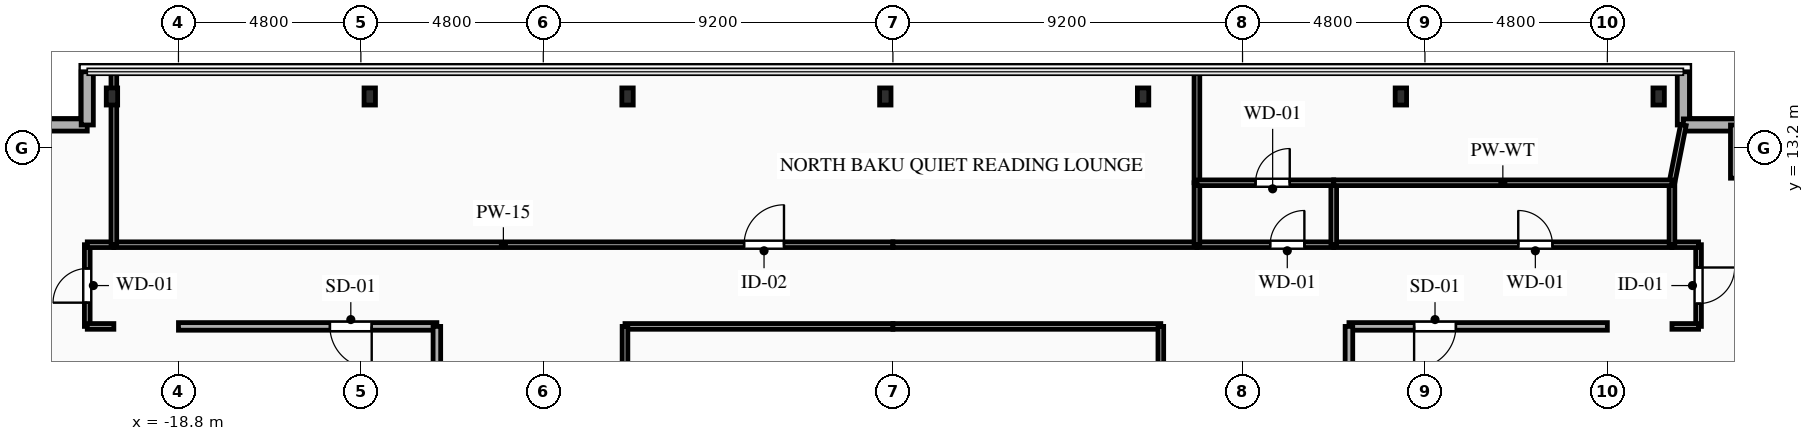
"""IFC4 building model, lengths in metres.
Left out: names, types, materials, properties, quantities, classifications, styles, units other than length and angle.
Written with IfcOpenShell. Run it as: python <this file> out.ifc"""

import sys

from ifc_helpers import new_model, si_unit, direction, frame, frame_2d, origin, origin_2d, place, context, subcontext, project, spatial, rectangle, i_section, extrude, element, fill, save


model = new_model("IFC4")
c1 = context("Model", 3, precision=1e-05, world=origin(), true_north=direction((0.0, 1.0)))
c2 = subcontext(c1, "Body", "Model", "MODEL_VIEW")
j1 = project(units=[si_unit("LENGTHUNIT", "METRE"), si_unit("PLANEANGLEUNIT", "RADIAN")], contexts=[c1])
p1 = place(None, origin())
s1 = spatial("IfcSite", under=j1, at=p1, CompositionType="ELEMENT")
p2 = place(p1, origin())
s2 = spatial("IfcBuilding", under=s1, at=p2, CompositionType="ELEMENT")
p3 = place(p2, frame((0.0, 0.0, 261.8)))
s3 = spatial("IfcBuildingStorey", under=s2, at=p3, CompositionType="ELEMENT", Elevation=261.8)
for number, where, z_axis, x_axis in (
    (1, (20.15, 14.55, 0.0), (0.0, 0.0, 1.0), (1.0, 0.0, 0.0)),
    (2, (13.367, 14.55, 0.0), (0.0, 0.0, 1.0), (1.0, 0.0, 0.0)),
    (3, (6.583, 14.55, 0.0), (0.0, 0.0, 1.0), (1.0, 0.0, 0.0)),
    (4, (-0.2, 14.55, 0.0), (0.0, 0.0, 1.0), (1.0, 0.0, 0.0)),
    (5, (-6.983, 14.55, 0.0), (0.0, 0.0, 1.0), (1.0, 0.0, 0.0)),
    (6, (-13.767, 14.55, 0.0), (0.0, 0.0, 1.0), (1.0, 0.0, 0.0)),
    (7, (-20.55, 14.55, 0.0), (0.0, 0.0, 1.0), (1.0, 0.0, 0.0)),
):
    element("IfcColumn", number, at=place(p3, frame(where, z_axis=z_axis, x_axis=x_axis)), inside=s3, PredefinedType="COLUMN", context=c2, shape_type="SweptSolid", body=[
        extrude(i_section(OverallWidth=0.3, OverallDepth=0.45, WebThickness=0.014, FlangeThickness=0.026, FilletRadius=0.027, at=origin_2d()), origin(), (0.0, 0.0, 1.0), 4.2),
    ])
p4 = place(p3, frame((-22.6, 13.8, 0.0), z_axis=(0.0, 0.0, 1.0), x_axis=(1.0, 0.0, 0.0)))
e8 = element("IfcWall", 8, at=p4, inside=s3, PredefinedType="SOLIDWALL", context=c2, shape_type="SweptSolid", body=[
    extrude(rectangle(XDim=1.4, YDim=0.32, at=frame_2d((0.7, 0.0))), origin(), (0.0, 0.0, 1.0), 3.78),
])
for number, where, z_axis, x_axis in (
    (9, (-21.2, 13.8, 0.0), (0.0, 0.0, 1.0), (0.0, 1.0, 0.0)),
    (10, (20.8, 15.2, 0.0), (0.0, 0.0, 1.0), (0.0, -1.0, 0.0)),
    (11, (20.8, 13.8, 0.0), (0.0, 0.0, 1.0), (1.0, 0.0, 0.0)),
):
    element("IfcWall", number, at=place(p3, frame(where, z_axis=z_axis, x_axis=x_axis)), inside=s3, PredefinedType="SOLIDWALL", context=c2, shape_type="SweptSolid", body=[
        extrude(rectangle(XDim=1.4, YDim=0.32, at=frame_2d((0.7, 0.0))), origin(), (0.0, 0.0, 1.0), 3.78),
    ])
p5 = place(p3, frame((22.2, 13.8, 0.0), z_axis=(0.0, 0.0, 1.0), x_axis=(0.0, -1.0, 0.0)))
e12 = element("IfcWall", 12, at=p5, inside=s3, PredefinedType="SOLIDWALL", context=c2, shape_type="SweptSolid", body=[
    extrude(rectangle(XDim=1.4, YDim=0.32, at=frame_2d((0.7, 0.0))), origin(), (0.0, 0.0, 1.0), 3.78),
])
p6 = place(p3, frame((-12.0, 8.5, 0.0), z_axis=(0.0, 0.0, 1.0), x_axis=(-1.0, 0.0, 0.0)))
e13 = element("IfcWall", 13, at=p6, inside=s3, PredefinedType="PARTITIONING", context=c2, shape_type="SweptSolid", body=[
    extrude(rectangle(XDim=6.8, YDim=0.2, at=frame_2d((3.4, 0.0))), origin(), (0.0, 0.0, 1.0), 3.78),
])
p7 = place(p6, frame((1.715, 0.0, 0.0)))
e14 = element("IfcOpeningElement", 14, at=p7, cuts=e13, PredefinedType="OPENING", context=c2, shape_type="SweptSolid", body=[
    extrude(rectangle(XDim=1.1, YDim=2.15, at=frame_2d((0.55, 1.075))), frame((0.0, 0.11, 0.0), z_axis=(0.0, -1.0, 0.0), x_axis=(1.0, 0.0, 0.0)), (0.0, 0.0, 1.0), 0.22),
])
p8 = place(p3, frame((-12.0, 5.6, 0.0), z_axis=(0.0, 0.0, 1.0), x_axis=(0.0, 1.0, 0.0)))
e15 = element("IfcWall", 15, at=p8, inside=s3, PredefinedType="PARTITIONING", context=c2, shape_type="SweptSolid", body=[
    extrude(rectangle(XDim=2.9, YDim=0.2, at=frame_2d((1.45, 0.0))), origin(), (0.0, 0.0, 1.0), 3.78),
])
p9 = place(p3, frame((18.8, 8.5, 0.0), z_axis=(0.0, 0.0, 1.0), x_axis=(-1.0, 0.0, 0.0)))
e16 = element("IfcWall", 16, at=p9, inside=s3, PredefinedType="PARTITIONING", context=c2, shape_type="SweptSolid", body=[
    extrude(rectangle(XDim=6.8, YDim=0.2, at=frame_2d((3.4, 0.0))), origin(), (0.0, 0.0, 1.0), 3.78),
])
p10 = place(p9, frame((3.985, 0.0, 0.0)))
e17 = element("IfcOpeningElement", 17, at=p10, cuts=e16, PredefinedType="OPENING", context=c2, shape_type="SweptSolid", body=[
    extrude(rectangle(XDim=1.1, YDim=2.15, at=frame_2d((0.55, 1.075))), frame((0.0, 0.11, 0.0), z_axis=(0.0, -1.0, 0.0), x_axis=(1.0, 0.0, 0.0)), (0.0, 0.0, 1.0), 0.22),
])
p11 = place(p3, frame((12.0, 8.5, 0.0), z_axis=(0.0, 0.0, 1.0), x_axis=(0.0, -1.0, 0.0)))
e18 = element("IfcWall", 18, at=p11, inside=s3, PredefinedType="PARTITIONING", context=c2, shape_type="SweptSolid", body=[
    extrude(rectangle(XDim=2.9, YDim=0.2, at=frame_2d((1.45, 0.0))), origin(), (0.0, 0.0, 1.0), 3.78),
])
p12 = place(p3, frame((-21.2, 8.5, 0.0), z_axis=(0.0, 0.0, 1.0), x_axis=(0.0, 1.0, 0.0)))
e19 = element("IfcWall", 19, at=p12, inside=s3, PredefinedType="PARTITIONING", context=c2, shape_type="SweptSolid", body=[
    extrude(rectangle(XDim=2.15, YDim=0.15, at=frame_2d((1.075, 0.0))), origin(), (0.0, 0.0, 1.0), 3.435),
])
p13 = place(p12, frame((0.625, 0.0, 0.0)))
e20 = element("IfcOpeningElement", 20, at=p13, cuts=e19, PredefinedType="OPENING", context=c2, shape_type="SweptSolid", body=[
    extrude(rectangle(XDim=0.9, YDim=2.1, at=frame_2d((0.45, 1.05))), frame((0.0, 0.085, 0.0), z_axis=(0.0, -1.0, 0.0), x_axis=(1.0, 0.0, 0.0)), (0.0, 0.0, 1.0), 0.17),
])
for number, where, z_axis, x_axis in (
    (21, (-20.5, 8.5, 0.0), (0.0, 0.0, 1.0), (-1.0, 0.0, 0.0)),
    (22, (-21.2, 10.65, 0.0), (0.0, 0.0, 1.0), (1.0, 0.0, 0.0)),
):
    element("IfcWall", number, at=place(p3, frame(where, z_axis=z_axis, x_axis=x_axis)), inside=s3, PredefinedType="PARTITIONING", context=c2, shape_type="SweptSolid", body=[
        extrude(rectangle(XDim=0.7, YDim=0.15, at=frame_2d((0.35, 0.0))), origin(), (0.0, 0.0, 1.0), 3.78),
    ])
p14 = place(p3, frame((-20.5, 10.65, 0.0), z_axis=(0.0, 0.0, 1.0), x_axis=(1.0, 0.0, 0.0)))
e23 = element("IfcWall", 23, at=p14, inside=s3, PredefinedType="PARTITIONING", context=c2, shape_type="SweptSolid", body=[
    extrude(rectangle(XDim=20.5, YDim=0.15, at=frame_2d((10.25, 0.0))), origin(), (0.0, 0.0, 1.0), 3.78),
])
p15 = place(p14, frame((16.584, 0.0, 0.0)))
e24 = element("IfcOpeningElement", 24, at=p15, cuts=e23, PredefinedType="OPENING", context=c2, shape_type="SweptSolid", body=[
    extrude(rectangle(XDim=1.05, YDim=2.15, at=frame_2d((0.525, 1.075))), frame((0.0, 0.085, 0.0), z_axis=(0.0, -1.0, 0.0), x_axis=(1.0, 0.0, 0.0)), (0.0, 0.0, 1.0), 0.17),
])
p16 = place(p3, frame((0.0, 8.5, 0.0), z_axis=(0.0, 0.0, 1.0), x_axis=(-1.0, 0.0, 0.0)))
e25 = element("IfcWall", 25, at=p16, inside=s3, PredefinedType="PARTITIONING", context=c2, shape_type="SweptSolid", body=[
    extrude(rectangle(XDim=7.05, YDim=0.15, at=frame_2d((3.525, 0.0))), origin(), (0.0, 0.0, 1.0), 3.78),
])
p17 = place(p3, frame((21.2, 10.65, 0.0), z_axis=(0.0, 0.0, 1.0), x_axis=(0.0, -1.0, 0.0)))
e26 = element("IfcWall", 26, at=p17, inside=s3, PredefinedType="PARTITIONING", context=c2, shape_type="SweptSolid", body=[
    extrude(rectangle(XDim=2.15, YDim=0.15, at=frame_2d((1.075, 0.0))), origin(), (0.0, 0.0, 1.0), 3.78),
])
p18 = place(p17, frame((0.6, 0.0, 0.0)))
e27 = element("IfcOpeningElement", 27, at=p18, cuts=e26, PredefinedType="OPENING", context=c2, shape_type="SweptSolid", body=[
    extrude(rectangle(XDim=0.95, YDim=2.1, at=frame_2d((0.475, 1.05))), frame((0.0, 0.085, 0.0), z_axis=(0.0, -1.0, 0.0), x_axis=(1.0, 0.0, 0.0)), (0.0, 0.0, 1.0), 0.17),
])
for number, where, z_axis, x_axis in (
    (28, (20.5, 10.65, 0.0), (0.0, 0.0, 1.0), (1.0, 0.0, 0.0)),
    (29, (21.2, 8.5, 0.0), (0.0, 0.0, 1.0), (-1.0, 0.0, 0.0)),
):
    element("IfcWall", number, at=place(p3, frame(where, z_axis=z_axis, x_axis=x_axis)), inside=s3, PredefinedType="PARTITIONING", context=c2, shape_type="SweptSolid", body=[
        extrude(rectangle(XDim=0.7, YDim=0.15, at=frame_2d((0.35, 0.0))), origin(), (0.0, 0.0, 1.0), 3.78),
    ])
p19 = place(p3, frame((0.0, 10.65, 0.0), z_axis=(0.0, 0.0, 1.0), x_axis=(1.0, 0.0, 0.0)))
e30 = element("IfcWall", 30, at=p19, inside=s3, PredefinedType="PARTITIONING", context=c2, shape_type="SweptSolid", body=[
    extrude(rectangle(XDim=8.0, YDim=0.15, at=frame_2d((4.0, 0.0))), origin(), (0.0, 0.0, 1.0), 3.78),
])
p20 = place(p3, frame((8.0, 10.65, 0.0), z_axis=(0.0, 0.0, 1.0), x_axis=(1.0, 0.0, 0.0)))
e31 = element("IfcWall", 31, at=p20, inside=s3, PredefinedType="PLUMBINGWALL", context=c2, shape_type="SweptSolid", body=[
    extrude(rectangle(XDim=3.6, YDim=0.15, at=frame_2d((1.8, 0.0))), origin(), (0.0, 0.0, 1.0), 3.78),
])
p21 = place(p20, frame((1.927, 0.0, 0.0)))
e32 = element("IfcOpeningElement", 32, at=p21, cuts=e31, PredefinedType="OPENING", context=c2, shape_type="SweptSolid", body=[
    extrude(rectangle(XDim=0.9, YDim=2.1, at=frame_2d((0.45, 1.05))), frame((0.0, 0.085, 0.0), z_axis=(0.0, -1.0, 0.0), x_axis=(1.0, 0.0, 0.0)), (0.0, 0.0, 1.0), 0.17),
])
p22 = place(p3, frame((11.6, 10.65, 0.0), z_axis=(0.0, 0.0, 1.0), x_axis=(1.0, 0.0, 0.0)))
e33 = element("IfcWall", 33, at=p22, inside=s3, PredefinedType="PLUMBINGWALL", context=c2, shape_type="SweptSolid", body=[
    extrude(rectangle(XDim=8.9, YDim=0.15, at=frame_2d((4.45, 0.0))), origin(), (0.0, 0.0, 1.0), 3.78),
])
p23 = place(p22, frame((4.855, 0.0, 0.0)))
e34 = element("IfcOpeningElement", 34, at=p23, cuts=e33, PredefinedType="OPENING", context=c2, shape_type="SweptSolid", body=[
    extrude(rectangle(XDim=0.9, YDim=2.1, at=frame_2d((0.45, 1.05))), frame((0.0, 0.085, 0.0), z_axis=(0.0, -1.0, 0.0), x_axis=(1.0, 0.0, 0.0)), (0.0, 0.0, 1.0), 0.17),
])
p24 = place(p3, frame((7.05, 8.5, 0.0), z_axis=(0.0, 0.0, 1.0), x_axis=(-1.0, 0.0, 0.0)))
e35 = element("IfcWall", 35, at=p24, inside=s3, PredefinedType="PARTITIONING", context=c2, shape_type="SweptSolid", body=[
    extrude(rectangle(XDim=7.05, YDim=0.15, at=frame_2d((3.525, 0.0))), origin(), (0.0, 0.0, 1.0), 3.78),
])
p25 = place(p3, frame((-7.05, 8.5, 0.0), z_axis=(0.0, 0.0, 1.0), x_axis=(0.0, -1.0, 0.0)))
e36 = element("IfcWall", 36, at=p25, inside=s3, PredefinedType="PARTITIONING", context=c2, shape_type="SweptSolid", body=[
    extrude(rectangle(XDim=14.1, YDim=0.15, at=frame_2d((7.05, 0.0))), origin(), (0.0, 0.0, 1.0), 3.78),
])
p26 = place(p25, frame((8.074, 0.0, 0.0)))
e37 = element("IfcOpeningElement", 37, at=p26, cuts=e36, PredefinedType="OPENING", context=c2, shape_type="SweptSolid", body=[
    extrude(rectangle(XDim=0.95, YDim=2.1, at=frame_2d((0.475, 1.05))), frame((0.0, 0.085, 0.0), z_axis=(0.0, -1.0, 0.0), x_axis=(1.0, 0.0, 0.0)), (0.0, 0.0, 1.0), 0.17),
])
p27 = place(p3, frame((7.05, -5.6, 0.0), z_axis=(0.0, 0.0, 1.0), x_axis=(0.0, 1.0, 0.0)))
e38 = element("IfcWall", 38, at=p27, inside=s3, PredefinedType="PARTITIONING", context=c2, shape_type="SweptSolid", body=[
    extrude(rectangle(XDim=14.1, YDim=0.15, at=frame_2d((7.05, 0.0))), origin(), (0.0, 0.0, 1.0), 3.78),
])
p28 = place(p3, frame((-20.5, 15.2, 0.0), z_axis=(0.0, 0.0, 1.0), x_axis=(0.0, -1.0, 0.0)))
e39 = element("IfcWall", 39, at=p28, inside=s3, PredefinedType="PARTITIONING", context=c2, shape_type="SweptSolid", body=[
    extrude(rectangle(XDim=4.55, YDim=0.15, at=frame_2d((2.275, 0.0))), origin(), (0.0, 0.0, 1.0), 3.405),
])
p29 = place(p3, frame((20.5, 10.65, 0.0), z_axis=(0.0, 0.0, 1.0), x_axis=(0.0, 1.0, 0.0)))
e40 = element("IfcWall", 40, at=p29, inside=s3, PredefinedType="PLUMBINGWALL", context=c2, shape_type="SweptSolid", body=[
    extrude(rectangle(XDim=1.63, YDim=0.15, at=frame_2d((0.815, 0.0))), origin(), (0.0, 0.0, 1.0), 3.78),
])
p30 = place(p3, frame((20.5, 12.28, 0.0), z_axis=(0.0, 0.0, 1.0), x_axis=(0.193660970649, 0.981068513636, 0.0)))
e41 = element("IfcWall", 41, at=p30, inside=s3, PredefinedType="PARTITIONING", context=c2, shape_type="SweptSolid", body=[
    extrude(rectangle(XDim=1.549, YDim=0.15, at=frame_2d((0.775, 0.0))), origin(), (0.0, 0.0, 1.0), 3.78),
])
p31 = place(p3, frame((8.0, 12.28, 0.0), z_axis=(0.0, 0.0, 1.0), x_axis=(0.0, -1.0, 0.0)))
e42 = element("IfcWall", 42, at=p31, inside=s3, PredefinedType="PLUMBINGWALL", context=c2, shape_type="SweptSolid", body=[
    extrude(rectangle(XDim=1.63, YDim=0.15, at=frame_2d((0.815, 0.0))), origin(), (0.0, 0.0, 1.0), 3.78),
])
p32 = place(p3, frame((8.0, 15.2, 0.0), z_axis=(0.0, 0.0, 1.0), x_axis=(0.0, -1.0, 0.0)))
e43 = element("IfcWall", 43, at=p32, inside=s3, PredefinedType="PARTITIONING", context=c2, shape_type="SweptSolid", body=[
    extrude(rectangle(XDim=2.92, YDim=0.15, at=frame_2d((1.46, 0.0))), origin(), (0.0, 0.0, 1.0), 3.78),
])
p33 = place(p3, frame((11.6, 12.28, 0.0), z_axis=(0.0, 0.0, 1.0), x_axis=(0.0, -1.0, 0.0)))
e44 = element("IfcWall", 44, at=p33, inside=s3, PredefinedType="PLUMBINGWALL", context=c2, shape_type="SweptSolid", body=[
    extrude(rectangle(XDim=1.63, YDim=0.15, at=frame_2d((0.815, 0.0))), origin(), (0.0, 0.0, 1.0), 3.78),
])
p34 = place(p3, frame((8.0, 12.28, 0.0), z_axis=(0.0, 0.0, 1.0), x_axis=(1.0, 0.0, 0.0)))
e45 = element("IfcWall", 45, at=p34, inside=s3, PredefinedType="PLUMBINGWALL", context=c2, shape_type="SweptSolid", body=[
    extrude(rectangle(XDim=3.6, YDim=0.15, at=frame_2d((1.8, 0.0))), origin(), (0.0, 0.0, 1.0), 3.78),
])
p35 = place(p34, frame((1.542, 0.0, 0.0)))
e46 = element("IfcOpeningElement", 46, at=p35, cuts=e45, PredefinedType="OPENING", context=c2, shape_type="SweptSolid", body=[
    extrude(rectangle(XDim=0.9, YDim=2.1, at=frame_2d((0.45, 1.05))), frame((0.0, 0.085, 0.0), z_axis=(0.0, -1.0, 0.0), x_axis=(1.0, 0.0, 0.0)), (0.0, 0.0, 1.0), 0.17),
])
p36 = place(p3, frame((11.6, 12.28, 0.0), z_axis=(0.0, 0.0, 1.0), x_axis=(1.0, 0.0, 0.0)))
e47 = element("IfcWall", 47, at=p36, inside=s3, PredefinedType="PLUMBINGWALL", context=c2, shape_type="SweptSolid", body=[
    extrude(rectangle(XDim=8.9, YDim=0.15, at=frame_2d((4.45, 0.0))), origin(), (0.0, 0.0, 1.0), 3.78),
])
p37 = place(p7, origin())
e48 = element("IfcDoor", 48, at=p37, inside=s3, OperationType="SINGLE_SWING_LEFT", PredefinedType="DOOR", context=c2, shape_type="SweptSolid", body=[
    extrude(rectangle(XDim=1.1, YDim=2.15, at=frame_2d((0.55, 1.075))), frame((0.0, 0.025, 0.0), z_axis=(0.0, -1.0, 0.0), x_axis=(1.0, 0.0, 0.0)), (0.0, 0.0, 1.0), 0.05),
])
fill(e14, e48)
p38 = place(p10, origin())
e49 = element("IfcDoor", 49, at=p38, inside=s3, OperationType="SINGLE_SWING_RIGHT", PredefinedType="DOOR", context=c2, shape_type="SweptSolid", body=[
    extrude(rectangle(XDim=1.1, YDim=2.15, at=frame_2d((0.55, 1.075))), frame((0.0, 0.025, 0.0), z_axis=(0.0, -1.0, 0.0), x_axis=(1.0, 0.0, 0.0)), (0.0, 0.0, 1.0), 0.05),
])
fill(e17, e49)
p39 = place(p13, origin())
e50 = element("IfcDoor", 50, at=p39, inside=s3, OperationType="SINGLE_SWING_LEFT", PredefinedType="DOOR", context=c2, shape_type="SweptSolid", body=[
    extrude(rectangle(XDim=0.9, YDim=2.1, at=frame_2d((0.45, 1.05))), frame((0.0, 0.025, 0.0), z_axis=(0.0, -1.0, 0.0), x_axis=(1.0, 0.0, 0.0)), (0.0, 0.0, 1.0), 0.05),
])
fill(e20, e50)
p40 = place(p15, origin())
e51 = element("IfcDoor", 51, at=p40, inside=s3, OperationType="SINGLE_SWING_RIGHT", PredefinedType="DOOR", context=c2, shape_type="SweptSolid", body=[
    extrude(rectangle(XDim=1.05, YDim=2.15, at=frame_2d((0.525, 1.075))), frame((0.0, 0.025, 0.0), z_axis=(0.0, -1.0, 0.0), x_axis=(1.0, 0.0, 0.0)), (0.0, 0.0, 1.0), 0.05),
])
fill(e24, e51)
p41 = place(p18, origin())
e52 = element("IfcDoor", 52, at=p41, inside=s3, OperationType="SINGLE_SWING_LEFT", PredefinedType="DOOR", context=c2, shape_type="SweptSolid", body=[
    extrude(rectangle(XDim=0.95, YDim=2.1, at=frame_2d((0.475, 1.05))), frame((0.0, 0.025, 0.0), z_axis=(0.0, -1.0, 0.0), x_axis=(1.0, 0.0, 0.0)), (0.0, 0.0, 1.0), 0.05),
])
fill(e27, e52)
p42 = place(p21, origin())
e53 = element("IfcDoor", 53, at=p42, inside=s3, OperationType="SINGLE_SWING_RIGHT", PredefinedType="DOOR", context=c2, shape_type="SweptSolid", body=[
    extrude(rectangle(XDim=0.9, YDim=2.1, at=frame_2d((0.45, 1.05))), frame((0.0, 0.025, 0.0), z_axis=(0.0, -1.0, 0.0), x_axis=(1.0, 0.0, 0.0)), (0.0, 0.0, 1.0), 0.05),
])
fill(e32, e53)
p43 = place(p23, origin())
e54 = element("IfcDoor", 54, at=p43, inside=s3, OperationType="SINGLE_SWING_LEFT", PredefinedType="DOOR", context=c2, shape_type="SweptSolid", body=[
    extrude(rectangle(XDim=0.9, YDim=2.1, at=frame_2d((0.45, 1.05))), frame((0.0, 0.025, 0.0), z_axis=(0.0, -1.0, 0.0), x_axis=(1.0, 0.0, 0.0)), (0.0, 0.0, 1.0), 0.05),
])
fill(e34, e54)
p44 = place(p35, origin())
e55 = element("IfcDoor", 55, at=p44, inside=s3, OperationType="SINGLE_SWING_RIGHT", PredefinedType="DOOR", context=c2, shape_type="SweptSolid", body=[
    extrude(rectangle(XDim=0.9, YDim=2.1, at=frame_2d((0.45, 1.05))), frame((0.0, 0.025, 0.0), z_axis=(0.0, -1.0, 0.0), x_axis=(1.0, 0.0, 0.0)), (0.0, 0.0, 1.0), 0.05),
])
fill(e46, e55)
save(model, sys.argv[1])
